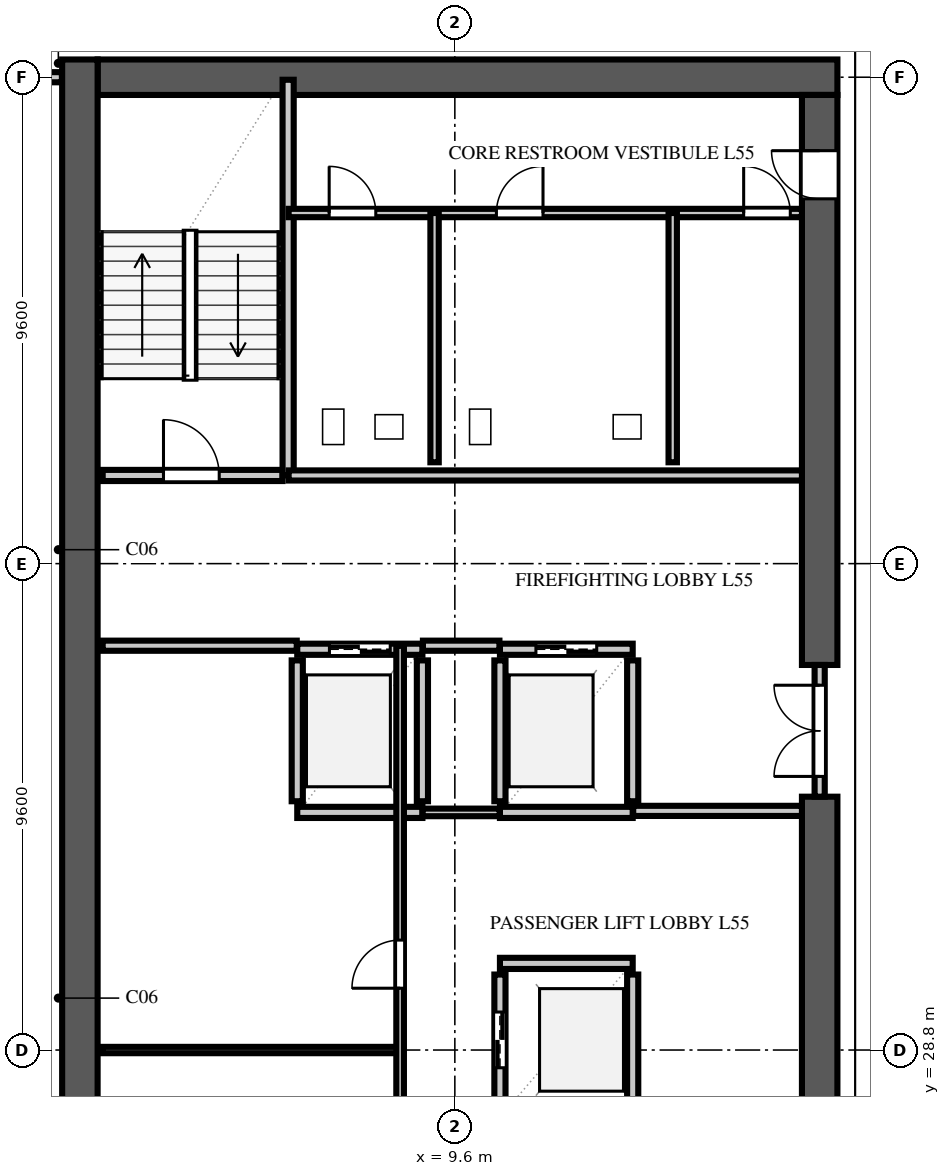
"""IFC4 building model, lengths in metres.
Left out: names, types, materials, properties, quantities, classifications, styles, units other than length and angle.
Written with IfcOpenShell. Run it as: python <this file> out.ifc"""

import sys

from ifc_helpers import new_model, si_unit, direction, frame, frame_2d, origin, place, context, subcontext, project, spatial, rectangle, extrude, element, fill, save


model = new_model("IFC4")
c1 = context("Model", 3, precision=1e-05, world=origin(), true_north=direction((0.0, 1.0)))
c2 = subcontext(c1, "Body", "Model", "MODEL_VIEW")
j1 = project(units=[si_unit("LENGTHUNIT", "METRE"), si_unit("PLANEANGLEUNIT", "RADIAN")], contexts=[c1])
p1 = place(None, origin())
s1 = spatial("IfcSite", under=j1, at=p1, CompositionType="ELEMENT")
p2 = place(p1, origin())
s2 = spatial("IfcBuilding", under=s1, at=p2, CompositionType="ELEMENT")
p3 = place(p2, frame((0.0, 0.0, 218.0)))
s3 = spatial("IfcBuildingStorey", under=s2, at=p3, CompositionType="ELEMENT", Elevation=218.0)
p4 = place(p3, frame((2.55, 48.0, 0.0), z_axis=(0.0, 0.0, 1.0), x_axis=(1.0, 0.0, 0.0)))
e1 = element("IfcWall", 1, at=p4, inside=s3, PredefinedType="SHEAR", context=c2, shape_type="SweptSolid", body=[
    extrude(rectangle(XDim=14.6, YDim=0.7, at=frame_2d((7.3, 0.0))), origin(), (0.0, 0.0, 1.0), 3.54),
])
p5 = place(p3, frame((2.2, 9.25, 0.0), z_axis=(0.0, 0.0, 1.0), x_axis=(0.0, 1.0, 0.0)))
e2 = element("IfcWall", 2, at=p5, inside=s3, PredefinedType="SHEAR", context=c2, shape_type="SweptSolid", body=[
    extrude(rectangle(XDim=39.1, YDim=0.7, at=frame_2d((19.55, 0.0))), origin(), (0.0, 0.0, 1.0), 3.54),
])
p6 = place(p3, frame((16.8, 26.0, 0.0), z_axis=(0.0, 0.0, 1.0), x_axis=(0.0, 1.0, 0.0)))
e3 = element("IfcWall", 3, at=p6, inside=s3, PredefinedType="SHEAR", context=c2, shape_type="SweptSolid", body=[
    extrude(rectangle(XDim=7.8, YDim=0.7, at=frame_2d((3.9, 0.0))), origin(), (0.0, 0.0, 1.0), 3.54),
])
p7 = place(p3, frame((16.8, 36.4, 0.0), z_axis=(0.0, 0.0, 1.0), x_axis=(0.0, 1.0, 0.0)))
e4 = element("IfcWall", 4, at=p7, inside=s3, PredefinedType="SHEAR", context=c2, shape_type="SweptSolid", body=[
    extrude(rectangle(XDim=11.25, YDim=0.7, at=frame_2d((5.625, 0.0))), origin(), (0.0, 0.0, 1.0), 3.54),
])
p8 = place(p7, frame((9.2, 0.0, 0.0)))
e5 = element("IfcOpeningElement", 5, at=p8, cuts=e4, PredefinedType="OPENING", context=c2, shape_type="SweptSolid", body=[
    extrude(rectangle(XDim=0.95, YDim=2.15, at=frame_2d((0.475, 1.075))), frame((0.0, 0.362, 0.0), z_axis=(0.0, -1.0, 0.0), x_axis=(1.0, 0.0, 0.0)), (0.0, 0.0, 1.0), 0.724),
])
p9 = place(p3, frame((2.65, 40.14, 0.0), z_axis=(0.0, 0.0, 1.0), x_axis=(1.0, 0.0, 0.0)))
e6 = element("IfcWall", 6, at=p9, inside=s3, PredefinedType="SOLIDWALL", context=c2, shape_type="SweptSolid", body=[
    extrude(rectangle(XDim=3.55, YDim=0.22, at=frame_2d((1.775, 0.0))), origin(), (0.0, 0.0, 1.0), 3.54),
])
p10 = place(p9, frame((1.2, 0.0, 0.0)))
e7 = element("IfcOpeningElement", 7, at=p10, cuts=e6, PredefinedType="OPENING", context=c2, shape_type="SweptSolid", body=[
    extrude(rectangle(XDim=1.1, YDim=2.2, at=frame_2d((0.55, 1.1))), frame((0.0, 0.122, 0.0), z_axis=(0.0, -1.0, 0.0), x_axis=(1.0, 0.0, 0.0)), (0.0, 0.0, 1.0), 0.244),
])
p11 = place(p3, frame((6.31, 40.14, 0.0), z_axis=(0.0, 0.0, 1.0), x_axis=(0.0, 1.0, 0.0)))
e8 = element("IfcWall", 8, at=p11, inside=s3, PredefinedType="SOLIDWALL", context=c2, shape_type="SweptSolid", body=[
    extrude(rectangle(XDim=7.81, YDim=0.22, at=frame_2d((3.905, 0.0))), origin(), (0.0, 0.0, 1.0), 3.54),
])
p12 = place(p3, frame((10.49, 27.71, 0.0), z_axis=(0.0, 0.0, 1.0), x_axis=(0.0, 1.0, 0.0)))
e9 = element("IfcWall", 9, at=p12, inside=s3, PredefinedType="SOLIDWALL", context=c2, shape_type="SweptSolid", body=[
    extrude(rectangle(XDim=2.58, YDim=0.22, at=frame_2d((1.29, 0.0))), origin(), (0.0, 0.0, 1.0), 3.54),
])
p13 = place(p12, frame((0.74, 0.0, 0.0)))
e10 = element("IfcOpeningElement", 10, at=p13, cuts=e9, PredefinedType="OPENING", context=c2, shape_type="SweptSolid", body=[
    extrude(rectangle(XDim=1.1, YDim=2.2, at=frame_2d((0.55, 1.1))), frame((0.0, 0.122, 0.0), z_axis=(0.0, -1.0, 0.0), x_axis=(1.0, 0.0, 0.0)), (0.0, 0.0, 1.0), 0.244),
])
p14 = place(p3, frame((13.11, 27.71, 0.0), z_axis=(0.0, 0.0, 1.0), x_axis=(0.0, 1.0, 0.0)))
e11 = element("IfcWall", 11, at=p14, inside=s3, PredefinedType="SOLIDWALL", context=c2, shape_type="SweptSolid", body=[
    extrude(rectangle(XDim=2.58, YDim=0.22, at=frame_2d((1.29, 0.0))), origin(), (0.0, 0.0, 1.0), 3.54),
])
p15 = place(p3, frame((10.49, 30.51, 0.0), z_axis=(0.0, 0.0, 1.0), x_axis=(1.0, 0.0, 0.0)))
e12 = element("IfcWall", 12, at=p15, inside=s3, PredefinedType="SOLIDWALL", context=c2, shape_type="SweptSolid", body=[
    extrude(rectangle(XDim=2.62, YDim=0.22, at=frame_2d((1.31, 0.0))), origin(), (0.0, 0.0, 1.0), 3.54),
])
for number, where, z_axis, x_axis in (
    (13, (6.49, 33.71, 0.0), (0.0, 0.0, 1.0), (0.0, 1.0, 0.0)),
    (14, (8.96, 33.71, 0.0), (0.0, 0.0, 1.0), (0.0, 1.0, 0.0)),
):
    element("IfcWall", number, at=place(p3, frame(where, z_axis=z_axis, x_axis=x_axis)), inside=s3, PredefinedType="SOLIDWALL", context=c2, shape_type="SweptSolid", body=[
        extrude(rectangle(XDim=2.78, YDim=0.22, at=frame_2d((1.39, 0.0))), origin(), (0.0, 0.0, 1.0), 3.54),
    ])
p16 = place(p3, frame((6.49, 33.49, 0.0), z_axis=(0.0, 0.0, 1.0), x_axis=(1.0, 0.0, 0.0)))
e15 = element("IfcWall", 15, at=p16, inside=s3, PredefinedType="SOLIDWALL", context=c2, shape_type="SweptSolid", body=[
    extrude(rectangle(XDim=2.47, YDim=0.22, at=frame_2d((1.235, 0.0))), origin(), (0.0, 0.0, 1.0), 3.54),
])
p17 = place(p3, frame((6.49, 36.71, 0.0), z_axis=(0.0, 0.0, 1.0), x_axis=(1.0, 0.0, 0.0)))
e16 = element("IfcWall", 16, at=p17, inside=s3, PredefinedType="SOLIDWALL", context=c2, shape_type="SweptSolid", body=[
    extrude(rectangle(XDim=2.47, YDim=0.22, at=frame_2d((1.235, 0.0))), origin(), (0.0, 0.0, 1.0), 3.54),
])
p18 = place(p17, frame((0.635, 0.0, 0.0)))
e17 = element("IfcOpeningElement", 17, at=p18, cuts=e16, PredefinedType="OPENING", context=c2, shape_type="SweptSolid", body=[
    extrude(rectangle(XDim=1.2, YDim=2.2, at=frame_2d((0.6, 1.1))), frame((0.0, 0.122, 0.0), z_axis=(0.0, -1.0, 0.0), x_axis=(1.0, 0.0, 0.0)), (0.0, 0.0, 1.0), 0.244),
])
for number, where, z_axis, x_axis in (
    (18, (10.49, 33.71, 0.0), (0.0, 0.0, 1.0), (0.0, 1.0, 0.0)),
    (19, (13.11, 33.71, 0.0), (0.0, 0.0, 1.0), (0.0, 1.0, 0.0)),
):
    element("IfcWall", number, at=place(p3, frame(where, z_axis=z_axis, x_axis=x_axis)), inside=s3, PredefinedType="SOLIDWALL", context=c2, shape_type="SweptSolid", body=[
        extrude(rectangle(XDim=2.78, YDim=0.22, at=frame_2d((1.39, 0.0))), origin(), (0.0, 0.0, 1.0), 3.54),
    ])
p19 = place(p3, frame((10.49, 33.49, 0.0), z_axis=(0.0, 0.0, 1.0), x_axis=(1.0, 0.0, 0.0)))
e20 = element("IfcWall", 20, at=p19, inside=s3, PredefinedType="SOLIDWALL", context=c2, shape_type="SweptSolid", body=[
    extrude(rectangle(XDim=2.62, YDim=0.22, at=frame_2d((1.31, 0.0))), origin(), (0.0, 0.0, 1.0), 3.54),
])
p20 = place(p3, frame((10.49, 36.71, 0.0), z_axis=(0.0, 0.0, 1.0), x_axis=(1.0, 0.0, 0.0)))
e21 = element("IfcWall", 21, at=p20, inside=s3, PredefinedType="SOLIDWALL", context=c2, shape_type="SweptSolid", body=[
    extrude(rectangle(XDim=2.62, YDim=0.22, at=frame_2d((1.31, 0.0))), origin(), (0.0, 0.0, 1.0), 3.54),
])
p21 = place(p20, frame((0.71, 0.0, 0.0)))
e22 = element("IfcOpeningElement", 22, at=p21, cuts=e21, PredefinedType="OPENING", context=c2, shape_type="SweptSolid", body=[
    extrude(rectangle(XDim=1.2, YDim=2.2, at=frame_2d((0.6, 1.1))), frame((0.0, 0.122, 0.0), z_axis=(0.0, -1.0, 0.0), x_axis=(1.0, 0.0, 0.0)), (0.0, 0.0, 1.0), 0.244),
])
p22 = place(p3, frame((2.65, 36.78, 0.0), z_axis=(0.0, 0.0, 1.0), x_axis=(1.0, 0.0, 0.0)))
e23 = element("IfcWall", 23, at=p22, inside=s3, PredefinedType="SOLIDWALL", context=c2, shape_type="SweptSolid", body=[
    extrude(rectangle(XDim=3.83, YDim=0.2, at=frame_2d((1.915, 0.0))), origin(), (0.0, 0.0, 1.0), 3.54),
])
p23 = place(p3, frame((8.97, 36.78, 0.0), z_axis=(0.0, 0.0, 1.0), x_axis=(1.0, 0.0, 0.0)))
e24 = element("IfcWall", 24, at=p23, inside=s3, PredefinedType="SOLIDWALL", context=c2, shape_type="SweptSolid", body=[
    extrude(rectangle(XDim=1.51, YDim=0.2, at=frame_2d((0.755, 0.0))), origin(), (0.0, 0.0, 1.0), 3.54),
])
p24 = place(p3, frame((13.12, 33.52, 0.0), z_axis=(0.0, 0.0, 1.0), x_axis=(1.0, 0.0, 0.0)))
e25 = element("IfcWall", 25, at=p24, inside=s3, PredefinedType="SOLIDWALL", context=c2, shape_type="SweptSolid", body=[
    extrude(rectangle(XDim=3.33, YDim=0.2, at=frame_2d((1.665, 0.0))), origin(), (0.0, 0.0, 1.0), 3.54),
])
p25 = place(p3, frame((6.32, 40.14, 0.0), z_axis=(0.0, 0.0, 1.0), x_axis=(1.0, 0.0, 0.0)))
e26 = element("IfcWall", 26, at=p25, inside=s3, PredefinedType="SOLIDWALL", context=c2, shape_type="SweptSolid", body=[
    extrude(rectangle(XDim=10.13, YDim=0.2, at=frame_2d((5.065, 0.0))), origin(), (0.0, 0.0, 1.0), 3.54),
])
p26 = place(p3, frame((16.8, 33.8, 0.0), z_axis=(0.0, 0.0, 1.0), x_axis=(0.0, 1.0, 0.0)))
e27 = element("IfcWall", 27, at=p26, inside=s3, PredefinedType="SOLIDWALL", context=c2, shape_type="SweptSolid", body=[
    extrude(rectangle(XDim=2.6, YDim=0.2, at=frame_2d((1.3, 0.0))), origin(), (0.0, 0.0, 1.0), 3.54),
])
p27 = place(p26, frame((0.4, 0.0, 0.0)))
e28 = element("IfcOpeningElement", 28, at=p27, cuts=e27, PredefinedType="OPENING", context=c2, shape_type="SweptSolid", body=[
    extrude(rectangle(XDim=1.8, YDim=2.2, at=frame_2d((0.9, 1.1))), frame((0.0, 0.112, 0.0), z_axis=(0.0, -1.0, 0.0), x_axis=(1.0, 0.0, 0.0)), (0.0, 0.0, 1.0), 0.224),
])
p28 = place(p3, frame((8.965, 33.49, 0.0), z_axis=(0.0, 0.0, 1.0), x_axis=(1.0, 0.0, 0.0)))
e29 = element("IfcWall", 29, at=p28, inside=s3, PredefinedType="PARTITIONING", context=c2, shape_type="SweptSolid", body=[
    extrude(rectangle(XDim=1.52, YDim=0.15, at=frame_2d((0.76, 0.0))), origin(), (0.0, 0.0, 1.0), 3.54),
])
p29 = place(p3, frame((2.65, 28.8, 0.0), z_axis=(0.0, 0.0, 1.0), x_axis=(1.0, 0.0, 0.0)))
e30 = element("IfcWall", 30, at=p29, inside=s3, PredefinedType="PARTITIONING", context=c2, shape_type="SweptSolid", body=[
    extrude(rectangle(XDim=5.87, YDim=0.125, at=frame_2d((2.935, 0.0))), origin(), (0.0, 0.0, 1.0), 3.54),
])
p30 = place(p3, frame((8.52, 12.02, 0.0), z_axis=(0.0, 0.0, 1.0), x_axis=(0.0, 1.0, 0.0)))
e31 = element("IfcWall", 31, at=p30, inside=s3, PredefinedType="PARTITIONING", context=c2, shape_type="SweptSolid", body=[
    extrude(rectangle(XDim=24.76, YDim=0.15, at=frame_2d((12.38, 0.0))), origin(), (0.0, 0.0, 1.0), 3.54),
])
p31 = place(p30, frame((2.0, 0.0, 0.0)))
e32 = element("IfcOpeningElement", 32, at=p31, cuts=e31, PredefinedType="OPENING", context=c2, shape_type="SweptSolid", body=[
    extrude(rectangle(XDim=0.85, YDim=2.1, at=frame_2d((0.425, 1.05))), frame((0.0, 0.087, 0.0), z_axis=(0.0, -1.0, 0.0), x_axis=(1.0, 0.0, 0.0)), (0.0, 0.0, 1.0), 0.174),
])
p32 = place(p30, frame((11.0, 0.0, 0.0)))
e33 = element("IfcOpeningElement", 33, at=p32, cuts=e31, PredefinedType="OPENING", context=c2, shape_type="SweptSolid", body=[
    extrude(rectangle(XDim=0.95, YDim=2.15, at=frame_2d((0.475, 1.075))), frame((0.0, 0.087, 0.0), z_axis=(0.0, -1.0, 0.0), x_axis=(1.0, 0.0, 0.0)), (0.0, 0.0, 1.0), 0.174),
])
p33 = place(p30, frame((18.0, 0.0, 0.0)))
e34 = element("IfcOpeningElement", 34, at=p33, cuts=e31, PredefinedType="OPENING", context=c2, shape_type="SweptSolid", body=[
    extrude(rectangle(XDim=0.95, YDim=2.15, at=frame_2d((0.475, 1.075))), frame((0.0, 0.087, 0.0), z_axis=(0.0, -1.0, 0.0), x_axis=(1.0, 0.0, 0.0)), (0.0, 0.0, 1.0), 0.174),
])
p34 = place(p3, frame((6.32, 45.32, 0.0), z_axis=(0.0, 0.0, 1.0), x_axis=(1.0, 0.0, 0.0)))
e35 = element("IfcWall", 35, at=p34, inside=s3, PredefinedType="PLUMBINGWALL", context=c2, shape_type="SweptSolid", body=[
    extrude(rectangle(XDim=10.13, YDim=0.165, at=frame_2d((5.065, 0.0))), origin(), (0.0, 0.0, 1.0), 3.54),
])
p35 = place(p34, frame((0.8, 0.0, 0.0)))
e36 = element("IfcOpeningElement", 36, at=p35, cuts=e35, PredefinedType="OPENING", context=c2, shape_type="SweptSolid", body=[
    extrude(rectangle(XDim=0.92, YDim=2.15, at=frame_2d((0.46, 1.075))), frame((0.0, 0.094, 0.0), z_axis=(0.0, -1.0, 0.0), x_axis=(1.0, 0.0, 0.0)), (0.0, 0.0, 1.0), 0.189),
])
p36 = place(p34, frame((4.1, 0.0, 0.0)))
e37 = element("IfcOpeningElement", 37, at=p36, cuts=e35, PredefinedType="OPENING", context=c2, shape_type="SweptSolid", body=[
    extrude(rectangle(XDim=0.92, YDim=2.15, at=frame_2d((0.46, 1.075))), frame((0.0, 0.094, 0.0), z_axis=(0.0, -1.0, 0.0), x_axis=(1.0, 0.0, 0.0)), (0.0, 0.0, 1.0), 0.189),
])
p37 = place(p34, frame((8.98, 0.0, 0.0)))
e38 = element("IfcOpeningElement", 38, at=p37, cuts=e35, PredefinedType="OPENING", context=c2, shape_type="SweptSolid", body=[
    extrude(rectangle(XDim=0.92, YDim=2.15, at=frame_2d((0.46, 1.075))), frame((0.0, 0.094, 0.0), z_axis=(0.0, -1.0, 0.0), x_axis=(1.0, 0.0, 0.0)), (0.0, 0.0, 1.0), 0.189),
])
for number, where, z_axis, x_axis in (
    (39, (9.2, 40.4, 0.0), (0.0, 0.0, 1.0), (0.0, 1.0, 0.0)),
    (40, (13.9, 40.4, 0.0), (0.0, 0.0, 1.0), (0.0, 1.0, 0.0)),
):
    element("IfcWall", number, at=place(p3, frame(where, z_axis=z_axis, x_axis=x_axis)), inside=s3, PredefinedType="PLUMBINGWALL", context=c2, shape_type="SweptSolid", body=[
        extrude(rectangle(XDim=4.92, YDim=0.165, at=frame_2d((2.46, 0.0))), origin(), (0.0, 0.0, 1.0), 3.54),
    ])
p38 = place(p3, frame((0.85, 48.0, 0.0), z_axis=(0.0, 0.0, 1.0), x_axis=(1.0, 0.0, 0.0)))
e41 = element("IfcWall", 41, at=p38, inside=s3, PredefinedType="SOLIDWALL", context=c2, shape_type="SweptSolid", body=[
    extrude(rectangle(XDim=0.995, YDim=0.2, at=frame_2d((0.498, 0.0))), origin(), (0.0, 0.0, 1.0), 3.54),
])
p39 = place(p10, origin())
e42 = element("IfcDoor", 42, at=p39, inside=s3, OperationType="SINGLE_SWING_LEFT", PredefinedType="DOOR", context=c2, shape_type="SweptSolid", body=[
    extrude(rectangle(XDim=1.1, YDim=2.2, at=frame_2d((0.55, 1.1))), frame((0.0, 0.025, 0.0), z_axis=(0.0, -1.0, 0.0), x_axis=(1.0, 0.0, 0.0)), (0.0, 0.0, 1.0), 0.05),
])
fill(e7, e42)
p40 = place(p13, origin())
e43 = element("IfcDoor", 43, at=p40, inside=s3, OperationType="DOUBLE_DOOR_SLIDING", PredefinedType="DOOR", context=c2, shape_type="SweptSolid", body=[
    extrude(rectangle(XDim=1.1, YDim=2.2, at=frame_2d((0.55, 1.1))), frame((0.0, 0.025, 0.0), z_axis=(0.0, -1.0, 0.0), x_axis=(1.0, 0.0, 0.0)), (0.0, 0.0, 1.0), 0.05),
])
fill(e10, e43)
p41 = place(p18, origin())
e44 = element("IfcDoor", 44, at=p41, inside=s3, OperationType="DOUBLE_DOOR_SLIDING", PredefinedType="DOOR", context=c2, shape_type="SweptSolid", body=[
    extrude(rectangle(XDim=1.2, YDim=2.2, at=frame_2d((0.6, 1.1))), frame((0.0, 0.025, 0.0), z_axis=(0.0, -1.0, 0.0), x_axis=(1.0, 0.0, 0.0)), (0.0, 0.0, 1.0), 0.05),
])
fill(e17, e44)
p42 = place(p21, origin())
e45 = element("IfcDoor", 45, at=p42, inside=s3, OperationType="DOUBLE_DOOR_SLIDING", PredefinedType="DOOR", context=c2, shape_type="SweptSolid", body=[
    extrude(rectangle(XDim=1.2, YDim=2.2, at=frame_2d((0.6, 1.1))), frame((0.0, 0.025, 0.0), z_axis=(0.0, -1.0, 0.0), x_axis=(1.0, 0.0, 0.0)), (0.0, 0.0, 1.0), 0.05),
])
fill(e22, e45)
p43 = place(p8, origin())
e46 = element("IfcDoor", 46, at=p43, inside=s3, OperationType="SINGLE_SWING_RIGHT", PredefinedType="DOOR", context=c2, shape_type="SweptSolid", body=[
    extrude(rectangle(XDim=0.95, YDim=2.15, at=frame_2d((0.475, 1.075))), frame((0.0, 0.025, 0.0), z_axis=(0.0, -1.0, 0.0), x_axis=(1.0, 0.0, 0.0)), (0.0, 0.0, 1.0), 0.05),
])
fill(e5, e46)
p44 = place(p27, origin())
e47 = element("IfcDoor", 47, at=p44, inside=s3, OperationType="DOUBLE_DOOR_SINGLE_SWING", PredefinedType="DOOR", context=c2, shape_type="SweptSolid", body=[
    extrude(rectangle(XDim=1.8, YDim=2.2, at=frame_2d((0.9, 1.1))), frame((0.0, 0.025, 0.0), z_axis=(0.0, -1.0, 0.0), x_axis=(1.0, 0.0, 0.0)), (0.0, 0.0, 1.0), 0.05),
])
fill(e28, e47)
p45 = place(p33, origin())
e48 = element("IfcDoor", 48, at=p45, inside=s3, OperationType="SINGLE_SWING_LEFT", PredefinedType="DOOR", context=c2, shape_type="SweptSolid", body=[
    extrude(rectangle(XDim=0.95, YDim=2.15, at=frame_2d((0.475, 1.075))), frame((0.0, 0.025, 0.0), z_axis=(0.0, -1.0, 0.0), x_axis=(1.0, 0.0, 0.0)), (0.0, 0.0, 1.0), 0.05),
])
fill(e34, e48)
p46 = place(p35, origin())
e49 = element("IfcDoor", 49, at=p46, inside=s3, OperationType="SINGLE_SWING_LEFT", PredefinedType="DOOR", context=c2, shape_type="SweptSolid", body=[
    extrude(rectangle(XDim=0.92, YDim=2.15, at=frame_2d((0.46, 1.075))), frame((0.0, 0.025, 0.0), z_axis=(0.0, -1.0, 0.0), x_axis=(1.0, 0.0, 0.0)), (0.0, 0.0, 1.0), 0.05),
])
fill(e36, e49)
p47 = place(p36, origin())
e50 = element("IfcDoor", 50, at=p47, inside=s3, OperationType="SINGLE_SWING_RIGHT", PredefinedType="DOOR", context=c2, shape_type="SweptSolid", body=[
    extrude(rectangle(XDim=0.92, YDim=2.15, at=frame_2d((0.46, 1.075))), frame((0.0, 0.025, 0.0), z_axis=(0.0, -1.0, 0.0), x_axis=(1.0, 0.0, 0.0)), (0.0, 0.0, 1.0), 0.05),
])
fill(e37, e50)
p48 = place(p37, origin())
e51 = element("IfcDoor", 51, at=p48, inside=s3, OperationType="SINGLE_SWING_LEFT", PredefinedType="DOOR", context=c2, shape_type="SweptSolid", body=[
    extrude(rectangle(XDim=0.92, YDim=2.15, at=frame_2d((0.46, 1.075))), frame((0.0, 0.025, 0.0), z_axis=(0.0, -1.0, 0.0), x_axis=(1.0, 0.0, 0.0)), (0.0, 0.0, 1.0), 0.05),
])
fill(e38, e51)
save(model, sys.argv[1])
